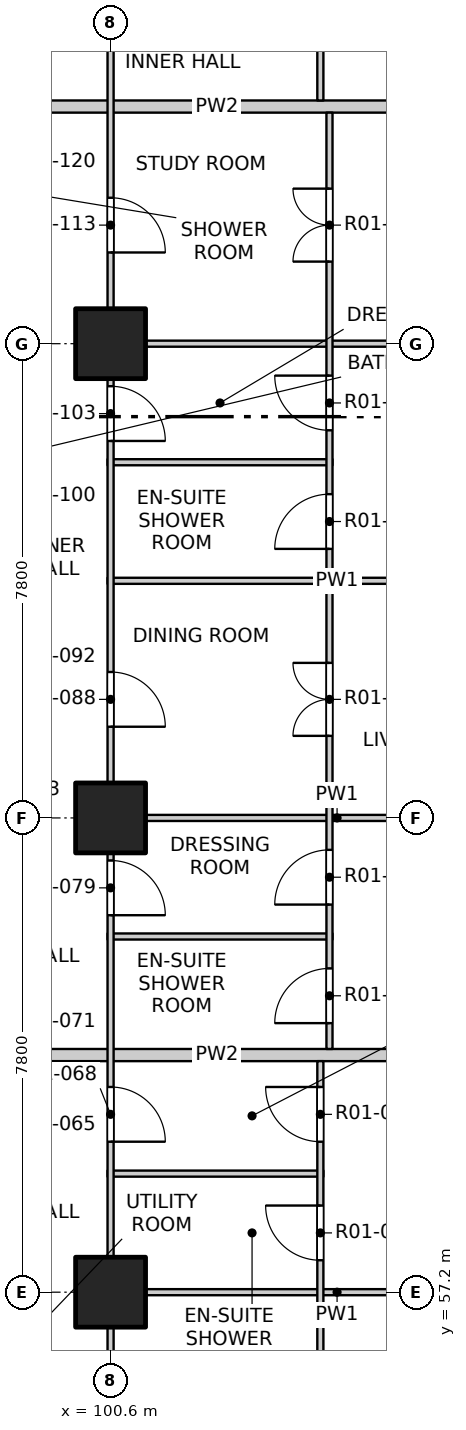
"""IFC4 building model, lengths in metres.
Left out: names, types, materials, properties, quantities, classifications, styles, units other than length and angle.
Written with IfcOpenShell. Run it as: python <this file> out.ifc"""

import sys

from ifc_helpers import new_model, si_unit, direction, frame, frame_2d, origin, origin_2d, place, context, subcontext, project, spatial, rectangle, extrude, element, fill, save


model = new_model("IFC4")
c1 = context("Model", 3, precision=1e-05, world=origin(), true_north=direction((0.0, 1.0)))
c2 = subcontext(c1, "Body", "Model", "MODEL_VIEW")
j1 = project(units=[si_unit("LENGTHUNIT", "METRE"), si_unit("PLANEANGLEUNIT", "RADIAN")], contexts=[c1])
p1 = place(None, origin())
s1 = spatial("IfcSite", under=j1, at=p1, CompositionType="ELEMENT")
p2 = place(p1, origin())
s2 = spatial("IfcBuilding", under=s1, at=p2, CompositionType="ELEMENT")
p3 = place(p2, frame((0.0, 0.0, 26.3)))
s3 = spatial("IfcBuildingStorey", under=s2, at=p3, CompositionType="ELEMENT", Elevation=26.3)
for number, where, z_axis, x_axis in (
    (1, (100.6, 57.2, -0.25), (0.0, 0.0, 1.0), (1.0, 0.0, 0.0)),
    (2, (100.6, 65.0, -0.25), (0.0, 0.0, 1.0), (1.0, 0.0, 0.0)),
    (3, (100.6, 72.8, -0.25), (0.0, 0.0, 1.0), (1.0, 0.0, 0.0)),
):
    element("IfcColumn", number, at=place(p3, frame(where, z_axis=z_axis, x_axis=x_axis)), inside=s3, PredefinedType="COLUMN", context=c2, shape_type="SweptSolid", body=[
        extrude(rectangle(XDim=1.15, YDim=1.15, at=origin_2d()), origin(), (0.0, 0.0, 1.0), 3.4),
    ])
p4 = place(p3, frame((100.55, 57.2, 0.0), z_axis=(0.0, 0.0, 1.0), x_axis=(1.0, 0.0, 0.0)))
e4 = element("IfcWall", 4, at=p4, inside=s3, PredefinedType="PARTITIONING", context=c2, shape_type="SweptSolid", body=[
    extrude(rectangle(XDim=7.55, YDim=0.1, at=frame_2d((3.775, 0.0))), origin(), (0.0, 0.0, 1.0), 2.55),
])
p5 = place(p3, frame((100.55, 59.15, 0.0), z_axis=(0.0, 0.0, 1.0), x_axis=(1.0, 0.0, 0.0)))
e5 = element("IfcWall", 5, at=p5, inside=s3, PredefinedType="PARTITIONING", context=c2, shape_type="SweptSolid", body=[
    extrude(rectangle(XDim=3.55, YDim=0.1, at=frame_2d((1.775, 0.0))), origin(), (0.0, 0.0, 1.0), 3.15),
])
p6 = place(p3, frame((96.6, 61.1, 0.0), z_axis=(0.0, 0.0, 1.0), x_axis=(1.0, 0.0, 0.0)))
e6 = element("IfcWall", 6, at=p6, inside=s3, PredefinedType="PARTITIONING", context=c2, shape_type="SweptSolid", body=[
    extrude(rectangle(XDim=11.5, YDim=0.2, at=frame_2d((5.75, 0.0))), origin(), (0.0, 0.0, 1.0), 3.15),
])
p7 = place(p3, frame((100.55, 63.05, 0.0), z_axis=(0.0, 0.0, 1.0), x_axis=(1.0, 0.0, 0.0)))
e7 = element("IfcWall", 7, at=p7, inside=s3, PredefinedType="PARTITIONING", context=c2, shape_type="SweptSolid", body=[
    extrude(rectangle(XDim=3.7, YDim=0.1, at=frame_2d((1.85, 0.0))), origin(), (0.0, 0.0, 1.0), 3.15),
])
p8 = place(p3, frame((100.55, 65.0, 0.0), z_axis=(0.0, 0.0, 1.0), x_axis=(1.0, 0.0, 0.0)))
e8 = element("IfcWall", 8, at=p8, inside=s3, PredefinedType="PARTITIONING", context=c2, shape_type="SweptSolid", body=[
    extrude(rectangle(XDim=7.55, YDim=0.1, at=frame_2d((3.775, 0.0))), origin(), (0.0, 0.0, 1.0), 2.55),
])
p9 = place(p3, frame((100.55, 68.9, 0.0), z_axis=(0.0, 0.0, 1.0), x_axis=(1.0, 0.0, 0.0)))
e9 = element("IfcWall", 9, at=p9, inside=s3, PredefinedType="PARTITIONING", context=c2, shape_type="SweptSolid", body=[
    extrude(rectangle(XDim=7.55, YDim=0.1, at=frame_2d((3.775, 0.0))), origin(), (0.0, 0.0, 1.0), 3.15),
])
p10 = place(p3, frame((100.55, 70.85, 0.0), z_axis=(0.0, 0.0, 1.0), x_axis=(1.0, 0.0, 0.0)))
e10 = element("IfcWall", 10, at=p10, inside=s3, PredefinedType="PARTITIONING", context=c2, shape_type="SweptSolid", body=[
    extrude(rectangle(XDim=3.7, YDim=0.1, at=frame_2d((1.85, 0.0))), origin(), (0.0, 0.0, 1.0), 3.15),
])
p11 = place(p3, frame((100.55, 72.8, 0.0), z_axis=(0.0, 0.0, 1.0), x_axis=(1.0, 0.0, 0.0)))
e11 = element("IfcWall", 11, at=p11, inside=s3, PredefinedType="PARTITIONING", context=c2, shape_type="SweptSolid", body=[
    extrude(rectangle(XDim=7.55, YDim=0.1, at=frame_2d((3.775, 0.0))), origin(), (0.0, 0.0, 1.0), 2.55),
])
p12 = place(p3, frame((96.6, 76.7, 0.0), z_axis=(0.0, 0.0, 1.0), x_axis=(1.0, 0.0, 0.0)))
e12 = element("IfcWall", 12, at=p12, inside=s3, PredefinedType="PARTITIONING", context=c2, shape_type="SweptSolid", body=[
    extrude(rectangle(XDim=11.5, YDim=0.2, at=frame_2d((5.75, 0.0))), origin(), (0.0, 0.0, 1.0), 3.15),
])
p13 = place(p3, frame((100.6, 49.4, 0.0), z_axis=(0.0, 0.0, 1.0), x_axis=(0.0, 1.0, 0.0)))
e13 = element("IfcWall", 13, at=p13, inside=s3, PredefinedType="PARTITIONING", context=c2, shape_type="SweptSolid", body=[
    extrude(rectangle(XDim=31.2, YDim=0.1, at=frame_2d((15.6, 0.0))), origin(), (0.0, 0.0, 1.0), 3.15),
])
p14 = place(p13, frame((1.5, 0.0, 0.0)))
e14 = element("IfcOpeningElement", 14, at=p14, cuts=e13, PredefinedType="OPENING", context=c2, shape_type="SweptSolid", body=[
    extrude(rectangle(XDim=0.9, YDim=2.1, at=frame_2d((0.45, 1.05))), frame((0.0, 0.06, 0.0), z_axis=(0.0, -1.0, 0.0), x_axis=(1.0, 0.0, 0.0)), (0.0, 0.0, 1.0), 0.12),
])
p15 = place(p13, frame((5.4, 0.0, 0.0)))
e15 = element("IfcOpeningElement", 15, at=p15, cuts=e13, PredefinedType="OPENING", context=c2, shape_type="SweptSolid", body=[
    extrude(rectangle(XDim=0.9, YDim=2.1, at=frame_2d((0.45, 1.05))), frame((0.0, 0.06, 0.0), z_axis=(0.0, -1.0, 0.0), x_axis=(1.0, 0.0, 0.0)), (0.0, 0.0, 1.0), 0.12),
])
p16 = place(p13, frame((10.275, 0.0, 0.0)))
e16 = element("IfcOpeningElement", 16, at=p16, cuts=e13, PredefinedType="OPENING", context=c2, shape_type="SweptSolid", body=[
    extrude(rectangle(XDim=0.9, YDim=2.1, at=frame_2d((0.45, 1.05))), frame((0.0, 0.06, 0.0), z_axis=(0.0, -1.0, 0.0), x_axis=(1.0, 0.0, 0.0)), (0.0, 0.0, 1.0), 0.12),
])
p17 = place(p13, frame((14.0, 0.0, 0.0)))
e17 = element("IfcOpeningElement", 17, at=p17, cuts=e13, PredefinedType="OPENING", context=c2, shape_type="SweptSolid", body=[
    extrude(rectangle(XDim=0.9, YDim=2.1, at=frame_2d((0.45, 1.05))), frame((0.0, 0.06, 0.0), z_axis=(0.0, -1.0, 0.0), x_axis=(1.0, 0.0, 0.0)), (0.0, 0.0, 1.0), 0.12),
])
p18 = place(p13, frame((17.1, 0.0, 0.0)))
e18 = element("IfcOpeningElement", 18, at=p18, cuts=e13, PredefinedType="OPENING", context=c2, shape_type="SweptSolid", body=[
    extrude(rectangle(XDim=0.9, YDim=2.1, at=frame_2d((0.45, 1.05))), frame((0.0, 0.06, 0.0), z_axis=(0.0, -1.0, 0.0), x_axis=(1.0, 0.0, 0.0)), (0.0, 0.0, 1.0), 0.12),
])
p19 = place(p13, frame((21.8, 0.0, 0.0)))
e19 = element("IfcOpeningElement", 19, at=p19, cuts=e13, PredefinedType="OPENING", context=c2, shape_type="SweptSolid", body=[
    extrude(rectangle(XDim=0.9, YDim=2.1, at=frame_2d((0.45, 1.05))), frame((0.0, 0.06, 0.0), z_axis=(0.0, -1.0, 0.0), x_axis=(1.0, 0.0, 0.0)), (0.0, 0.0, 1.0), 0.12),
])
p20 = place(p13, frame((24.9, 0.0, 0.0)))
e20 = element("IfcOpeningElement", 20, at=p20, cuts=e13, PredefinedType="OPENING", context=c2, shape_type="SweptSolid", body=[
    extrude(rectangle(XDim=0.9, YDim=2.1, at=frame_2d((0.45, 1.05))), frame((0.0, 0.06, 0.0), z_axis=(0.0, -1.0, 0.0), x_axis=(1.0, 0.0, 0.0)), (0.0, 0.0, 1.0), 0.12),
])
p21 = place(p13, frame((28.8, 0.0, 0.0)))
e21 = element("IfcOpeningElement", 21, at=p21, cuts=e13, PredefinedType="OPENING", context=c2, shape_type="SweptSolid", body=[
    extrude(rectangle(XDim=0.9, YDim=2.1, at=frame_2d((0.45, 1.05))), frame((0.0, 0.06, 0.0), z_axis=(0.0, -1.0, 0.0), x_axis=(1.0, 0.0, 0.0)), (0.0, 0.0, 1.0), 0.12),
])
p22 = place(p3, frame((104.05, 41.9, 0.0), z_axis=(0.0, 0.0, 1.0), x_axis=(0.0, 1.0, 0.0)))
e22 = element("IfcWall", 22, at=p22, inside=s3, PredefinedType="PARTITIONING", context=c2, shape_type="SweptSolid", body=[
    extrude(rectangle(XDim=19.1, YDim=0.1, at=frame_2d((9.55, 0.0))), origin(), (0.0, 0.0, 1.0), 3.15),
])
p23 = place(p22, frame((1.05, 0.0, 0.0)))
e23 = element("IfcOpeningElement", 23, at=p23, cuts=e22, PredefinedType="OPENING", context=c2, shape_type="SweptSolid", body=[
    extrude(rectangle(XDim=1.2, YDim=2.1, at=frame_2d((0.6, 1.05))), frame((0.0, 0.06, 0.0), z_axis=(0.0, -1.0, 0.0), x_axis=(1.0, 0.0, 0.0)), (0.0, 0.0, 1.0), 0.12),
])
p24 = place(p22, frame((4.125, 0.0, 0.0)))
e24 = element("IfcOpeningElement", 24, at=p24, cuts=e22, PredefinedType="OPENING", context=c2, shape_type="SweptSolid", body=[
    extrude(rectangle(XDim=0.9, YDim=2.1, at=frame_2d((0.45, 1.05))), frame((0.0, 0.06, 0.0), z_axis=(0.0, -1.0, 0.0), x_axis=(1.0, 0.0, 0.0)), (0.0, 0.0, 1.0), 0.12),
])
p25 = place(p22, frame((6.075, 0.0, 0.0)))
e25 = element("IfcOpeningElement", 25, at=p25, cuts=e22, PredefinedType="OPENING", context=c2, shape_type="SweptSolid", body=[
    extrude(rectangle(XDim=0.9, YDim=2.1, at=frame_2d((0.45, 1.05))), frame((0.0, 0.06, 0.0), z_axis=(0.0, -1.0, 0.0), x_axis=(1.0, 0.0, 0.0)), (0.0, 0.0, 1.0), 0.12),
])
p26 = place(p22, frame((8.85, 0.0, 0.0)))
e26 = element("IfcOpeningElement", 26, at=p26, cuts=e22, PredefinedType="OPENING", context=c2, shape_type="SweptSolid", body=[
    extrude(rectangle(XDim=1.2, YDim=2.1, at=frame_2d((0.6, 1.05))), frame((0.0, 0.06, 0.0), z_axis=(0.0, -1.0, 0.0), x_axis=(1.0, 0.0, 0.0)), (0.0, 0.0, 1.0), 0.12),
])
p27 = place(p22, frame((12.75, 0.0, 0.0)))
e27 = element("IfcOpeningElement", 27, at=p27, cuts=e22, PredefinedType="OPENING", context=c2, shape_type="SweptSolid", body=[
    extrude(rectangle(XDim=1.2, YDim=2.1, at=frame_2d((0.6, 1.05))), frame((0.0, 0.06, 0.0), z_axis=(0.0, -1.0, 0.0), x_axis=(1.0, 0.0, 0.0)), (0.0, 0.0, 1.0), 0.12),
])
p28 = place(p22, frame((15.825, 0.0, 0.0)))
e28 = element("IfcOpeningElement", 28, at=p28, cuts=e22, PredefinedType="OPENING", context=c2, shape_type="SweptSolid", body=[
    extrude(rectangle(XDim=0.9, YDim=2.1, at=frame_2d((0.45, 1.05))), frame((0.0, 0.06, 0.0), z_axis=(0.0, -1.0, 0.0), x_axis=(1.0, 0.0, 0.0)), (0.0, 0.0, 1.0), 0.12),
])
p29 = place(p22, frame((17.775, 0.0, 0.0)))
e29 = element("IfcOpeningElement", 29, at=p29, cuts=e22, PredefinedType="OPENING", context=c2, shape_type="SweptSolid", body=[
    extrude(rectangle(XDim=0.9, YDim=2.1, at=frame_2d((0.45, 1.05))), frame((0.0, 0.06, 0.0), z_axis=(0.0, -1.0, 0.0), x_axis=(1.0, 0.0, 0.0)), (0.0, 0.0, 1.0), 0.12),
])
p30 = place(p3, frame((104.05, 76.8, 0.0), z_axis=(0.0, 0.0, 1.0), x_axis=(0.0, 1.0, 0.0)))
e30 = element("IfcWall", 30, at=p30, inside=s3, PredefinedType="PARTITIONING", context=c2, shape_type="SweptSolid", body=[
    extrude(rectangle(XDim=11.3, YDim=0.1, at=frame_2d((5.65, 0.0))), origin(), (0.0, 0.0, 1.0), 3.15),
])
p31 = place(p30, frame((1.25, 0.0, 0.0)))
e31 = element("IfcOpeningElement", 31, at=p31, cuts=e30, PredefinedType="OPENING", context=c2, shape_type="SweptSolid", body=[
    extrude(rectangle(XDim=1.2, YDim=2.1, at=frame_2d((0.6, 1.05))), frame((0.0, 0.06, 0.0), z_axis=(0.0, -1.0, 0.0), x_axis=(1.0, 0.0, 0.0)), (0.0, 0.0, 1.0), 0.12),
])
p32 = place(p30, frame((5.15, 0.0, 0.0)))
e32 = element("IfcOpeningElement", 32, at=p32, cuts=e30, PredefinedType="OPENING", context=c2, shape_type="SweptSolid", body=[
    extrude(rectangle(XDim=1.2, YDim=2.1, at=frame_2d((0.6, 1.05))), frame((0.0, 0.06, 0.0), z_axis=(0.0, -1.0, 0.0), x_axis=(1.0, 0.0, 0.0)), (0.0, 0.0, 1.0), 0.12),
])
p33 = place(p30, frame((9.05, 0.0, 0.0)))
e33 = element("IfcOpeningElement", 33, at=p33, cuts=e30, PredefinedType="OPENING", context=c2, shape_type="SweptSolid", body=[
    extrude(rectangle(XDim=1.2, YDim=2.1, at=frame_2d((0.6, 1.05))), frame((0.0, 0.06, 0.0), z_axis=(0.0, -1.0, 0.0), x_axis=(1.0, 0.0, 0.0)), (0.0, 0.0, 1.0), 0.12),
])
p34 = place(p3, frame((104.2, 61.2, 0.0), z_axis=(0.0, 0.0, 1.0), x_axis=(0.0, 1.0, 0.0)))
e34 = element("IfcWall", 34, at=p34, inside=s3, PredefinedType="PARTITIONING", context=c2, shape_type="SweptSolid", body=[
    extrude(rectangle(XDim=15.4, YDim=0.1, at=frame_2d((7.7, 0.0))), origin(), (0.0, 0.0, 1.0), 3.15),
])
p35 = place(p34, frame((0.425, 0.0, 0.0)))
e35 = element("IfcOpeningElement", 35, at=p35, cuts=e34, PredefinedType="OPENING", context=c2, shape_type="SweptSolid", body=[
    extrude(rectangle(XDim=0.9, YDim=2.1, at=frame_2d((0.45, 1.05))), frame((0.0, 0.06, 0.0), z_axis=(0.0, -1.0, 0.0), x_axis=(1.0, 0.0, 0.0)), (0.0, 0.0, 1.0), 0.12),
])
p36 = place(p34, frame((2.375, 0.0, 0.0)))
e36 = element("IfcOpeningElement", 36, at=p36, cuts=e34, PredefinedType="OPENING", context=c2, shape_type="SweptSolid", body=[
    extrude(rectangle(XDim=0.9, YDim=2.1, at=frame_2d((0.45, 1.05))), frame((0.0, 0.06, 0.0), z_axis=(0.0, -1.0, 0.0), x_axis=(1.0, 0.0, 0.0)), (0.0, 0.0, 1.0), 0.12),
])
p37 = place(p34, frame((5.15, 0.0, 0.0)))
e37 = element("IfcOpeningElement", 37, at=p37, cuts=e34, PredefinedType="OPENING", context=c2, shape_type="SweptSolid", body=[
    extrude(rectangle(XDim=1.2, YDim=2.1, at=frame_2d((0.6, 1.05))), frame((0.0, 0.06, 0.0), z_axis=(0.0, -1.0, 0.0), x_axis=(1.0, 0.0, 0.0)), (0.0, 0.0, 1.0), 0.12),
])
p38 = place(p34, frame((8.225, 0.0, 0.0)))
e38 = element("IfcOpeningElement", 38, at=p38, cuts=e34, PredefinedType="OPENING", context=c2, shape_type="SweptSolid", body=[
    extrude(rectangle(XDim=0.9, YDim=2.1, at=frame_2d((0.45, 1.05))), frame((0.0, 0.06, 0.0), z_axis=(0.0, -1.0, 0.0), x_axis=(1.0, 0.0, 0.0)), (0.0, 0.0, 1.0), 0.12),
])
p39 = place(p34, frame((10.175, 0.0, 0.0)))
e39 = element("IfcOpeningElement", 39, at=p39, cuts=e34, PredefinedType="OPENING", context=c2, shape_type="SweptSolid", body=[
    extrude(rectangle(XDim=0.9, YDim=2.1, at=frame_2d((0.45, 1.05))), frame((0.0, 0.06, 0.0), z_axis=(0.0, -1.0, 0.0), x_axis=(1.0, 0.0, 0.0)), (0.0, 0.0, 1.0), 0.12),
])
p40 = place(p34, frame((12.95, 0.0, 0.0)))
e40 = element("IfcOpeningElement", 40, at=p40, cuts=e34, PredefinedType="OPENING", context=c2, shape_type="SweptSolid", body=[
    extrude(rectangle(XDim=1.2, YDim=2.1, at=frame_2d((0.6, 1.05))), frame((0.0, 0.06, 0.0), z_axis=(0.0, -1.0, 0.0), x_axis=(1.0, 0.0, 0.0)), (0.0, 0.0, 1.0), 0.12),
])
p41 = place(p28, origin())
e41 = element("IfcDoor", 41, at=p41, inside=s3, OperationType="SINGLE_SWING_RIGHT", PredefinedType="DOOR", context=c2, shape_type="SweptSolid", body=[
    extrude(rectangle(XDim=0.9, YDim=2.1, at=frame_2d((0.45, 1.05))), frame((0.0, 0.025, 0.0), z_axis=(0.0, -1.0, 0.0), x_axis=(1.0, 0.0, 0.0)), (0.0, 0.0, 1.0), 0.05),
])
fill(e28, e41)
p42 = place(p16, origin())
e42 = element("IfcDoor", 42, at=p42, inside=s3, OperationType="SINGLE_SWING_RIGHT", PredefinedType="DOOR", context=c2, shape_type="SweptSolid", body=[
    extrude(rectangle(XDim=0.9, YDim=2.1, at=frame_2d((0.45, 1.05))), frame((0.0, 0.025, 0.0), z_axis=(0.0, -1.0, 0.0), x_axis=(1.0, 0.0, 0.0)), (0.0, 0.0, 1.0), 0.05),
])
fill(e16, e42)
p43 = place(p29, origin())
e43 = element("IfcDoor", 43, at=p43, inside=s3, OperationType="SINGLE_SWING_RIGHT", PredefinedType="DOOR", context=c2, shape_type="SweptSolid", body=[
    extrude(rectangle(XDim=0.9, YDim=2.1, at=frame_2d((0.45, 1.05))), frame((0.0, 0.025, 0.0), z_axis=(0.0, -1.0, 0.0), x_axis=(1.0, 0.0, 0.0)), (0.0, 0.0, 1.0), 0.05),
])
fill(e29, e43)
p44 = place(p35, origin())
e44 = element("IfcDoor", 44, at=p44, inside=s3, OperationType="SINGLE_SWING_LEFT", PredefinedType="DOOR", context=c2, shape_type="SweptSolid", body=[
    extrude(rectangle(XDim=0.9, YDim=2.1, at=frame_2d((0.45, 1.05))), frame((0.0, 0.025, 0.0), z_axis=(0.0, -1.0, 0.0), x_axis=(1.0, 0.0, 0.0)), (0.0, 0.0, 1.0), 0.05),
])
fill(e35, e44)
p45 = place(p17, origin())
e45 = element("IfcDoor", 45, at=p45, inside=s3, OperationType="SINGLE_SWING_RIGHT", PredefinedType="DOOR", context=c2, shape_type="SweptSolid", body=[
    extrude(rectangle(XDim=0.9, YDim=2.1, at=frame_2d((0.45, 1.05))), frame((0.0, 0.025, 0.0), z_axis=(0.0, -1.0, 0.0), x_axis=(1.0, 0.0, 0.0)), (0.0, 0.0, 1.0), 0.05),
])
fill(e17, e45)
p46 = place(p36, origin())
e46 = element("IfcDoor", 46, at=p46, inside=s3, OperationType="SINGLE_SWING_LEFT", PredefinedType="DOOR", context=c2, shape_type="SweptSolid", body=[
    extrude(rectangle(XDim=0.9, YDim=2.1, at=frame_2d((0.45, 1.05))), frame((0.0, 0.025, 0.0), z_axis=(0.0, -1.0, 0.0), x_axis=(1.0, 0.0, 0.0)), (0.0, 0.0, 1.0), 0.05),
])
fill(e36, e46)
p47 = place(p18, origin())
e47 = element("IfcDoor", 47, at=p47, inside=s3, OperationType="SINGLE_SWING_RIGHT", PredefinedType="DOOR", context=c2, shape_type="SweptSolid", body=[
    extrude(rectangle(XDim=0.9, YDim=2.1, at=frame_2d((0.45, 1.05))), frame((0.0, 0.025, 0.0), z_axis=(0.0, -1.0, 0.0), x_axis=(1.0, 0.0, 0.0)), (0.0, 0.0, 1.0), 0.05),
])
fill(e18, e47)
p48 = place(p37, origin())
e48 = element("IfcDoor", 48, at=p48, inside=s3, OperationType="DOUBLE_DOOR_SINGLE_SWING", PredefinedType="DOOR", context=c2, shape_type="SweptSolid", body=[
    extrude(rectangle(XDim=1.2, YDim=2.1, at=frame_2d((0.6, 1.05))), frame((0.0, 0.025, 0.0), z_axis=(0.0, -1.0, 0.0), x_axis=(1.0, 0.0, 0.0)), (0.0, 0.0, 1.0), 0.05),
])
fill(e37, e48)
p49 = place(p38, origin())
e49 = element("IfcDoor", 49, at=p49, inside=s3, OperationType="SINGLE_SWING_LEFT", PredefinedType="DOOR", context=c2, shape_type="SweptSolid", body=[
    extrude(rectangle(XDim=0.9, YDim=2.1, at=frame_2d((0.45, 1.05))), frame((0.0, 0.025, 0.0), z_axis=(0.0, -1.0, 0.0), x_axis=(1.0, 0.0, 0.0)), (0.0, 0.0, 1.0), 0.05),
])
fill(e38, e49)
p50 = place(p19, origin())
e50 = element("IfcDoor", 50, at=p50, inside=s3, OperationType="SINGLE_SWING_RIGHT", PredefinedType="DOOR", context=c2, shape_type="SweptSolid", body=[
    extrude(rectangle(XDim=0.9, YDim=2.1, at=frame_2d((0.45, 1.05))), frame((0.0, 0.025, 0.0), z_axis=(0.0, -1.0, 0.0), x_axis=(1.0, 0.0, 0.0)), (0.0, 0.0, 1.0), 0.05),
])
fill(e19, e50)
p51 = place(p39, origin())
e51 = element("IfcDoor", 51, at=p51, inside=s3, OperationType="SINGLE_SWING_RIGHT", PredefinedType="DOOR", context=c2, shape_type="SweptSolid", body=[
    extrude(rectangle(XDim=0.9, YDim=2.1, at=frame_2d((0.45, 1.05))), frame((0.0, 0.025, 0.0), z_axis=(0.0, -1.0, 0.0), x_axis=(1.0, 0.0, 0.0)), (0.0, 0.0, 1.0), 0.05),
])
fill(e39, e51)
p52 = place(p20, origin())
e52 = element("IfcDoor", 52, at=p52, inside=s3, OperationType="SINGLE_SWING_RIGHT", PredefinedType="DOOR", context=c2, shape_type="SweptSolid", body=[
    extrude(rectangle(XDim=0.9, YDim=2.1, at=frame_2d((0.45, 1.05))), frame((0.0, 0.025, 0.0), z_axis=(0.0, -1.0, 0.0), x_axis=(1.0, 0.0, 0.0)), (0.0, 0.0, 1.0), 0.05),
])
fill(e20, e52)
p53 = place(p40, origin())
e53 = element("IfcDoor", 53, at=p53, inside=s3, OperationType="DOUBLE_DOOR_SINGLE_SWING", PredefinedType="DOOR", context=c2, shape_type="SweptSolid", body=[
    extrude(rectangle(XDim=1.2, YDim=2.1, at=frame_2d((0.6, 1.05))), frame((0.0, 0.025, 0.0), z_axis=(0.0, -1.0, 0.0), x_axis=(1.0, 0.0, 0.0)), (0.0, 0.0, 1.0), 0.05),
])
fill(e40, e53)
save(model, sys.argv[1])
